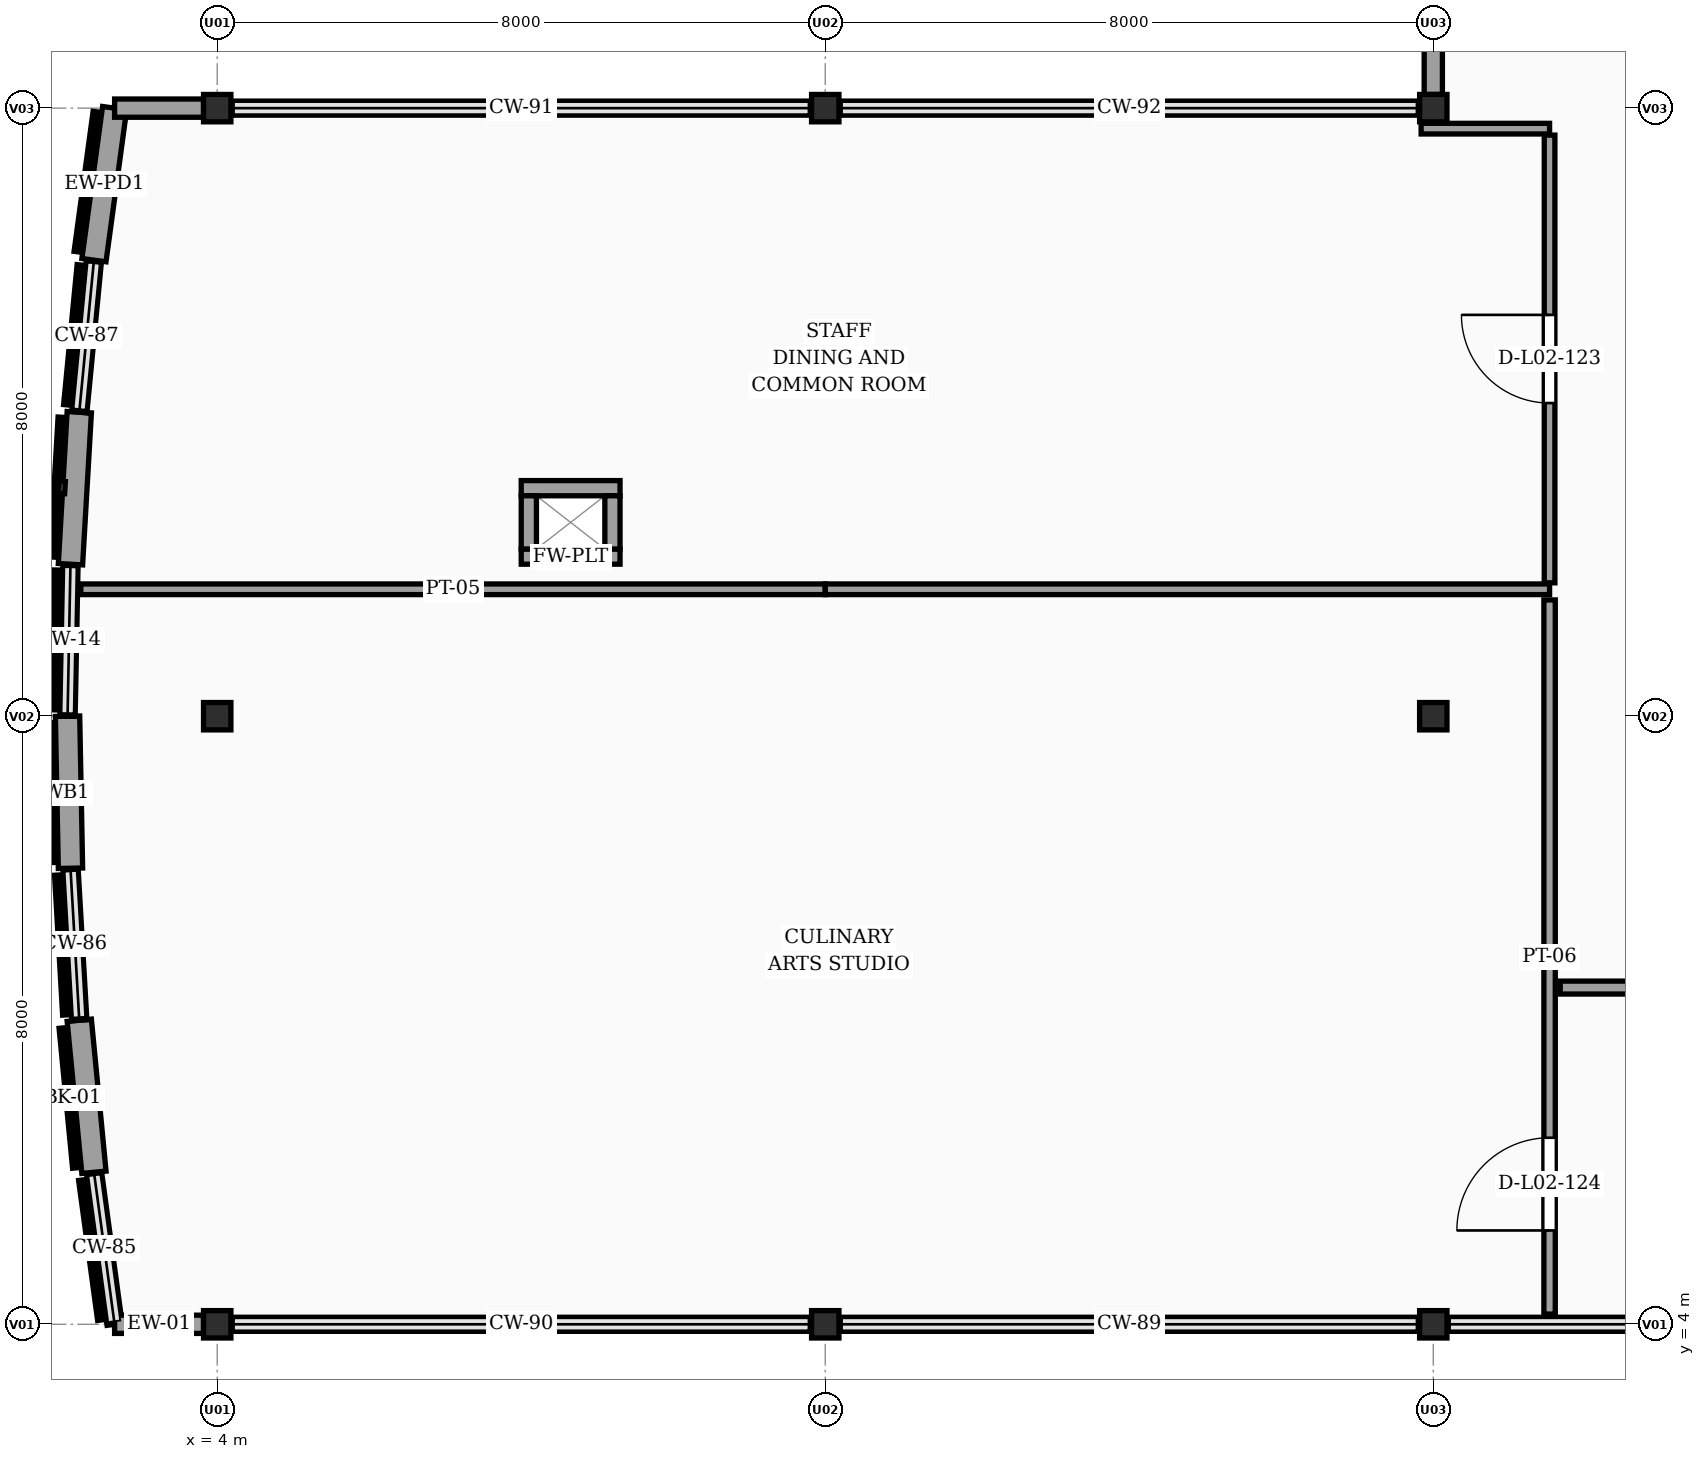
"""IFC4 building model, lengths in metres.
Left out: names, types, materials, properties, quantities, classifications, styles, units other than length and angle.
Written with IfcOpenShell. Run it as: python <this file> out.ifc"""

import sys

from ifc_helpers import new_model, si_unit, direction, frame, frame_2d, origin, origin_2d, place, context, subcontext, project, spatial, rectangle, extrude, element, fill, save


model = new_model("IFC4")
c1 = context("Model", 3, precision=1e-05, world=origin(), true_north=direction((0.0, 1.0)))
c2 = subcontext(c1, "Body", "Model", "MODEL_VIEW")
j1 = project(units=[si_unit("LENGTHUNIT", "METRE"), si_unit("PLANEANGLEUNIT", "RADIAN")], contexts=[c1])
p1 = place(None, origin())
s1 = spatial("IfcSite", under=j1, at=p1, CompositionType="ELEMENT")
p2 = place(p1, origin())
s2 = spatial("IfcBuilding", under=s1, at=p2, CompositionType="ELEMENT")
p3 = place(p2, frame((0.0, 0.0, 8.4)))
s3 = spatial("IfcBuildingStorey", under=s2, at=p3, CompositionType="ELEMENT", Elevation=8.4)
p4 = place(p3, frame((4.0, 4.0, 0.0), z_axis=(0.0, 0.0, 1.0), x_axis=(1.0, 0.0, 0.0)))
e1 = element("IfcColumn", 1, at=p4, inside=s3, PredefinedType="COLUMN", context=c2, shape_type="SweptSolid", body=[
    extrude(rectangle(XDim=0.36, YDim=0.36, at=origin_2d()), origin(), (0.0, 0.0, 1.0), 6.392),
])
p5 = place(p3, frame((4.0, 12.0, 0.0), z_axis=(0.0, 0.0, 1.0), x_axis=(1.0, 0.0, 0.0)))
e2 = element("IfcColumn", 2, at=p5, inside=s3, PredefinedType="COLUMN", context=c2, shape_type="SweptSolid", body=[
    extrude(rectangle(XDim=0.36, YDim=0.36, at=origin_2d()), origin(), (0.0, 0.0, 1.0), 4.462),
])
p6 = place(p3, frame((4.0, 20.0, 0.0), z_axis=(0.0, 0.0, 1.0), x_axis=(1.0, 0.0, 0.0)))
e3 = element("IfcColumn", 3, at=p6, inside=s3, PredefinedType="COLUMN", context=c2, shape_type="SweptSolid", body=[
    extrude(rectangle(XDim=0.36, YDim=0.36, at=origin_2d()), origin(), (0.0, 0.0, 1.0), 6.298),
])
p7 = place(p3, frame((12.0, 4.0, 0.0), z_axis=(0.0, 0.0, 1.0), x_axis=(1.0, 0.0, 0.0)))
e4 = element("IfcColumn", 4, at=p7, inside=s3, PredefinedType="COLUMN", context=c2, shape_type="SweptSolid", body=[
    extrude(rectangle(XDim=0.36, YDim=0.36, at=origin_2d()), origin(), (0.0, 0.0, 1.0), 6.225),
])
p8 = place(p3, frame((12.0, 20.0, 0.0), z_axis=(0.0, 0.0, 1.0), x_axis=(1.0, 0.0, 0.0)))
e5 = element("IfcColumn", 5, at=p8, inside=s3, PredefinedType="COLUMN", context=c2, shape_type="SweptSolid", body=[
    extrude(rectangle(XDim=0.36, YDim=0.36, at=origin_2d()), origin(), (0.0, 0.0, 1.0), 6.131),
])
p9 = place(p3, frame((20.0, 4.0, 0.0), z_axis=(0.0, 0.0, 1.0), x_axis=(1.0, 0.0, 0.0)))
e6 = element("IfcColumn", 6, at=p9, inside=s3, PredefinedType="COLUMN", context=c2, shape_type="SweptSolid", body=[
    extrude(rectangle(XDim=0.36, YDim=0.36, at=origin_2d()), origin(), (0.0, 0.0, 1.0), 6.057),
])
p10 = place(p3, frame((20.0, 12.0, 0.0), z_axis=(0.0, 0.0, 1.0), x_axis=(1.0, 0.0, 0.0)))
e7 = element("IfcColumn", 7, at=p10, inside=s3, PredefinedType="COLUMN", context=c2, shape_type="SweptSolid", body=[
    extrude(rectangle(XDim=0.36, YDim=0.36, at=origin_2d()), origin(), (0.0, 0.0, 1.0), 4.128),
])
p11 = place(p3, frame((20.0, 20.0, 0.0), z_axis=(0.0, 0.0, 1.0), x_axis=(1.0, 0.0, 0.0)))
e8 = element("IfcColumn", 8, at=p11, inside=s3, PredefinedType="COLUMN", context=c2, shape_type="SweptSolid", body=[
    extrude(rectangle(XDim=0.36, YDim=0.36, at=origin_2d()), origin(), (0.0, 0.0, 1.0), 5.963),
])
p12 = place(p3, frame((2.65, 4.0, 0.0), z_axis=(0.0, 0.0, 1.0), x_axis=(-0.134627389588, 0.990896294257, 0.0)))
e9 = element("IfcWall", 9, at=p12, inside=s3, PredefinedType="SOLIDWALL", context=c2, shape_type="SweptSolid", body=[
    extrude(rectangle(XDim=2.018, YDim=0.2, at=frame_2d((1.009, 0.0))), origin(), (0.0, 0.0, 1.0), 0.95),
])
p13 = place(p3, frame((2.378, 6.0, 0.0), z_axis=(0.0, 0.0, 1.0), x_axis=(-0.096110619057, 0.995370659053, 0.0)))
e10 = element("IfcWall", 10, at=p13, inside=s3, PredefinedType="SOLIDWALL", context=c2, shape_type="SweptSolid", body=[
    extrude(rectangle(XDim=2.009, YDim=0.32, at=frame_2d((1.005, 0.0))), origin(), (0.0, 0.0, 1.0), 5.465),
])
p14 = place(p3, frame((2.185, 8.0, 0.0), z_axis=(0.0, 0.0, 1.0), x_axis=(-0.05776471272, 0.998330224908, 0.0)))
e11 = element("IfcWall", 11, at=p14, inside=s3, PredefinedType="SOLIDWALL", context=c2, shape_type="SweptSolid", body=[
    extrude(rectangle(XDim=2.003, YDim=0.2, at=frame_2d((1.002, 0.0))), origin(), (0.0, 0.0, 1.0), 0.95),
])
p15 = place(p3, frame((2.069, 10.0, 0.0), z_axis=(0.0, 0.0, 1.0), x_axis=(-0.019161520385, 0.999816401214, 0.0)))
e12 = element("IfcWall", 12, at=p15, inside=s3, PredefinedType="SOLIDWALL", context=c2, shape_type="SweptSolid", body=[
    extrude(rectangle(XDim=2.0, YDim=0.32, at=frame_2d((1.0, 0.0))), origin(), (0.0, 0.0, 1.0), 4.504),
])
p16 = place(p3, frame((2.031, 12.0, 0.0), z_axis=(0.0, 0.0, 1.0), x_axis=(0.019161520385, 0.999816401214, 0.0)))
e13 = element("IfcWall", 13, at=p16, inside=s3, PredefinedType="SOLIDWALL", context=c2, shape_type="SweptSolid", body=[
    extrude(rectangle(XDim=2.0, YDim=0.2, at=frame_2d((1.0, 0.0))), origin(), (0.0, 0.0, 1.0), 0.95),
])
p17 = place(p3, frame((2.069, 14.0, 0.0), z_axis=(0.0, 0.0, 1.0), x_axis=(0.05776471272, 0.998330224908, 0.0)))
e14 = element("IfcWall", 14, at=p17, inside=s3, PredefinedType="SOLIDWALL", context=c2, shape_type="SweptSolid", body=[
    extrude(rectangle(XDim=2.003, YDim=0.32, at=frame_2d((1.002, 0.0))), origin(), (0.0, 0.0, 1.0), 4.962),
])
p18 = place(p3, frame((2.185, 16.0, 0.0), z_axis=(0.0, 0.0, 1.0), x_axis=(0.096110619057, 0.995370659053, 0.0)))
e15 = element("IfcWall", 15, at=p18, inside=s3, PredefinedType="SOLIDWALL", context=c2, shape_type="SweptSolid", body=[
    extrude(rectangle(XDim=2.009, YDim=0.2, at=frame_2d((1.005, 0.0))), origin(), (0.0, 0.0, 1.0), 0.95),
])
p19 = place(p3, frame((2.378, 18.0, 0.0), z_axis=(0.0, 0.0, 1.0), x_axis=(0.134627389588, 0.990896294257, 0.0)))
e16 = element("IfcWall", 16, at=p19, inside=s3, PredefinedType="SOLIDWALL", context=c2, shape_type="SweptSolid", body=[
    extrude(rectangle(XDim=2.018, YDim=0.32, at=frame_2d((1.009, 0.0))), origin(), (0.0, 0.0, 1.0), 5.873),
])
for number, where, z_axis, x_axis in (
    (17, (27.82, 4.0, 0.0), (0.0, 0.0, 1.0), (-1.0, 0.0, 0.0)),
    (18, (19.82, 4.0, 0.0), (0.0, 0.0, 1.0), (-1.0, 0.0, 0.0)),
    (19, (11.82, 4.0, 0.0), (0.0, 0.0, 1.0), (-1.0, 0.0, 0.0)),
):
    element("IfcWall", number, at=place(p3, frame(where, z_axis=z_axis, x_axis=x_axis)), inside=s3, PredefinedType="SOLIDWALL", context=c2, shape_type="SweptSolid", body=[
        extrude(rectangle(XDim=7.64, YDim=0.185, at=frame_2d((3.82, 0.0))), origin(), (0.0, 0.0, 1.0), 0.95),
    ])
for number, where, z_axis, x_axis in (
    (20, (3.82, 4.0, 0.0), (0.0, 0.0, 1.0), (-1.0, 0.0, 0.0)),
    (21, (2.65, 20.0, 0.0), (0.0, 0.0, 1.0), (1.0, 0.0, 0.0)),
):
    element("IfcWall", number, at=place(p3, frame(where, z_axis=z_axis, x_axis=x_axis)), inside=s3, PredefinedType="SOLIDWALL", context=c2, shape_type="SweptSolid", body=[
        extrude(rectangle(XDim=1.17, YDim=0.24, at=frame_2d((0.585, 0.0))), origin(), (0.0, 0.0, 1.0), 3.09),
    ])
for number, where, z_axis, x_axis in (
    (22, (4.18, 20.0, 0.0), (0.0, 0.0, 1.0), (1.0, 0.0, 0.0)),
    (23, (12.18, 20.0, 0.0), (0.0, 0.0, 1.0), (1.0, 0.0, 0.0)),
):
    element("IfcWall", number, at=place(p3, frame(where, z_axis=z_axis, x_axis=x_axis)), inside=s3, PredefinedType="SOLIDWALL", context=c2, shape_type="SweptSolid", body=[
        extrude(rectangle(XDim=7.64, YDim=0.185, at=frame_2d((3.82, 0.0))), origin(), (0.0, 0.0, 1.0), 0.95),
    ])
p20 = place(p3, frame((20.0, 20.18, 0.0), z_axis=(0.0, 0.0, 1.0), x_axis=(0.0, 1.0, 0.0)))
e24 = element("IfcWall", 24, at=p20, inside=s3, PredefinedType="SOLIDWALL", context=c2, shape_type="SweptSolid", body=[
    extrude(rectangle(XDim=4.42, YDim=0.24, at=frame_2d((2.21, 0.0))), origin(), (0.0, 0.0, 1.0), 3.65),
])
p21 = place(p20, frame((1.31, 0.0, 0.95)))
e25 = element("IfcOpeningElement", 25, at=p21, cuts=e24, PredefinedType="OPENING", context=c2, shape_type="SweptSolid", body=[
    extrude(rectangle(XDim=1.8, YDim=1.35, at=frame_2d((0.9, 0.675))), frame((0.0, 0.13, 0.0), z_axis=(0.0, -1.0, 0.0), x_axis=(1.0, 0.0, 0.0)), (0.0, 0.0, 1.0), 0.26),
])
for number, where, z_axis, x_axis in (
    (26, (9.3, 14.1, 0.0), (0.0, 0.0, 1.0), (-1.0, 0.0, 0.0)),
    (27, (8.0, 15.0, 0.0), (0.0, 0.0, 1.0), (1.0, 0.0, 0.0)),
):
    element("IfcWall", number, at=place(p3, frame(where, z_axis=z_axis, x_axis=x_axis)), inside=s3, PredefinedType="PARTITIONING", context=c2, shape_type="SweptSolid", body=[
        extrude(rectangle(XDim=1.3, YDim=0.2, at=frame_2d((0.65, 0.0))), origin(), (0.0, 0.0, 1.0), 3.65),
    ])
for number, where, z_axis, x_axis in (
    (28, (8.1, 14.2, 0.0), (0.0, 0.0, 1.0), (0.0, 1.0, 0.0)),
    (29, (9.2, 14.9, 0.0), (0.0, 0.0, 1.0), (0.0, -1.0, 0.0)),
):
    element("IfcWall", number, at=place(p3, frame(where, z_axis=z_axis, x_axis=x_axis)), inside=s3, PredefinedType="PARTITIONING", context=c2, shape_type="SweptSolid", body=[
        extrude(rectangle(XDim=0.7, YDim=0.2, at=frame_2d((0.35, 0.0))), origin(), (0.0, 0.0, 1.0), 3.65),
    ])
p22 = place(p3, frame((2.205, 13.67, 0.0), z_axis=(0.0, 0.0, 1.0), x_axis=(1.0, 0.0, 0.0)))
e30 = element("IfcWall", 30, at=p22, inside=s3, PredefinedType="PARTITIONING", context=c2, shape_type="SweptSolid", body=[
    extrude(rectangle(XDim=9.795, YDim=0.14, at=frame_2d((4.897, 0.0))), origin(), (0.0, 0.0, 1.0), 3.65),
])
p23 = place(p3, frame((12.0, 13.67, 0.0), z_axis=(0.0, 0.0, 1.0), x_axis=(1.0, 0.0, 0.0)))
e31 = element("IfcWall", 31, at=p23, inside=s3, PredefinedType="PARTITIONING", context=c2, shape_type="SweptSolid", body=[
    extrude(rectangle(XDim=9.53, YDim=0.14, at=frame_2d((4.765, 0.0))), origin(), (0.0, 0.0, 1.0), 3.65),
])
p24 = place(p3, frame((19.84, 19.73, 0.0), z_axis=(0.0, 0.0, 1.0), x_axis=(1.0, 0.0, 0.0)))
e32 = element("IfcWall", 32, at=p24, inside=s3, PredefinedType="PARTITIONING", context=c2, shape_type="SweptSolid", body=[
    extrude(rectangle(XDim=1.69, YDim=0.14, at=frame_2d((0.845, 0.0))), origin(), (0.0, 0.0, 1.0), 3.65),
])
p25 = place(p3, frame((21.53, 13.755, 0.0), z_axis=(0.0, 0.0, 1.0), x_axis=(0.0, 1.0, 0.0)))
e33 = element("IfcWall", 33, at=p25, inside=s3, PredefinedType="PARTITIONING", context=c2, shape_type="SweptSolid", body=[
    extrude(rectangle(XDim=5.89, YDim=0.14, at=frame_2d((2.945, 0.0))), origin(), (0.0, 0.0, 1.0), 3.65),
])
p26 = place(p25, frame((2.365, 0.0, 0.0)))
e34 = element("IfcOpeningElement", 34, at=p26, cuts=e33, PredefinedType="OPENING", context=c2, shape_type="SweptSolid", body=[
    extrude(rectangle(XDim=1.16, YDim=2.15, at=frame_2d((0.58, 1.075))), frame((0.0, 0.08, 0.0), z_axis=(0.0, -1.0, 0.0), x_axis=(1.0, 0.0, 0.0)), (0.0, 0.0, 1.0), 0.16),
])
p27 = place(p3, frame((21.53, 4.135, 0.0), z_axis=(0.0, 0.0, 1.0), x_axis=(0.0, 1.0, 0.0)))
e35 = element("IfcWall", 35, at=p27, inside=s3, PredefinedType="PARTITIONING", context=c2, shape_type="SweptSolid", body=[
    extrude(rectangle(XDim=9.396, YDim=0.15, at=frame_2d((4.698, 0.0))), origin(), (0.0, 0.0, 1.0), 3.65),
])
p28 = place(p27, frame((1.1, 0.0, 0.0)))
e36 = element("IfcOpeningElement", 36, at=p28, cuts=e35, PredefinedType="OPENING", context=c2, shape_type="SweptSolid", body=[
    extrude(rectangle(XDim=1.22, YDim=2.15, at=frame_2d((0.61, 1.075))), frame((0.0, 0.085, 0.0), z_axis=(0.0, -1.0, 0.0), x_axis=(1.0, 0.0, 0.0)), (0.0, 0.0, 1.0), 0.17),
])
p29 = place(p3, frame((21.67, 8.43, 0.0), z_axis=(0.0, 0.0, 1.0), x_axis=(1.0, 0.0, 0.0)))
e37 = element("IfcWall", 37, at=p29, inside=s3, PredefinedType="PARTITIONING", context=c2, shape_type="SweptSolid", body=[
    extrude(rectangle(XDim=6.196, YDim=0.17, at=frame_2d((3.098, 0.0))), origin(), (0.0, 0.0, 1.0), 3.65),
])
p30 = place(p29, frame((2.39, 0.0, 0.0)))
e38 = element("IfcOpeningElement", 38, at=p30, cuts=e37, PredefinedType="OPENING", context=c2, shape_type="SweptSolid", body=[
    extrude(rectangle(XDim=1.28, YDim=2.15, at=frame_2d((0.64, 1.075))), frame((0.0, 0.095, 0.0), z_axis=(0.0, -1.0, 0.0), x_axis=(1.0, 0.0, 0.0)), (0.0, 0.0, 1.0), 0.19),
])
p31 = place(p26, origin())
e39 = element("IfcDoor", 39, at=p31, inside=s3, OperationType="SINGLE_SWING_RIGHT", PredefinedType="DOOR", context=c2, shape_type="SweptSolid", body=[
    extrude(rectangle(XDim=1.16, YDim=2.15, at=frame_2d((0.58, 1.075))), frame((0.0, 0.025, 0.0), z_axis=(0.0, -1.0, 0.0), x_axis=(1.0, 0.0, 0.0)), (0.0, 0.0, 1.0), 0.05),
])
fill(e34, e39)
p32 = place(p28, origin())
e40 = element("IfcDoor", 40, at=p32, inside=s3, OperationType="SINGLE_SWING_LEFT", PredefinedType="DOOR", context=c2, shape_type="SweptSolid", body=[
    extrude(rectangle(XDim=1.22, YDim=2.15, at=frame_2d((0.61, 1.075))), frame((0.0, 0.025, 0.0), z_axis=(0.0, -1.0, 0.0), x_axis=(1.0, 0.0, 0.0)), (0.0, 0.0, 1.0), 0.05),
])
fill(e36, e40)
save(model, sys.argv[1])
